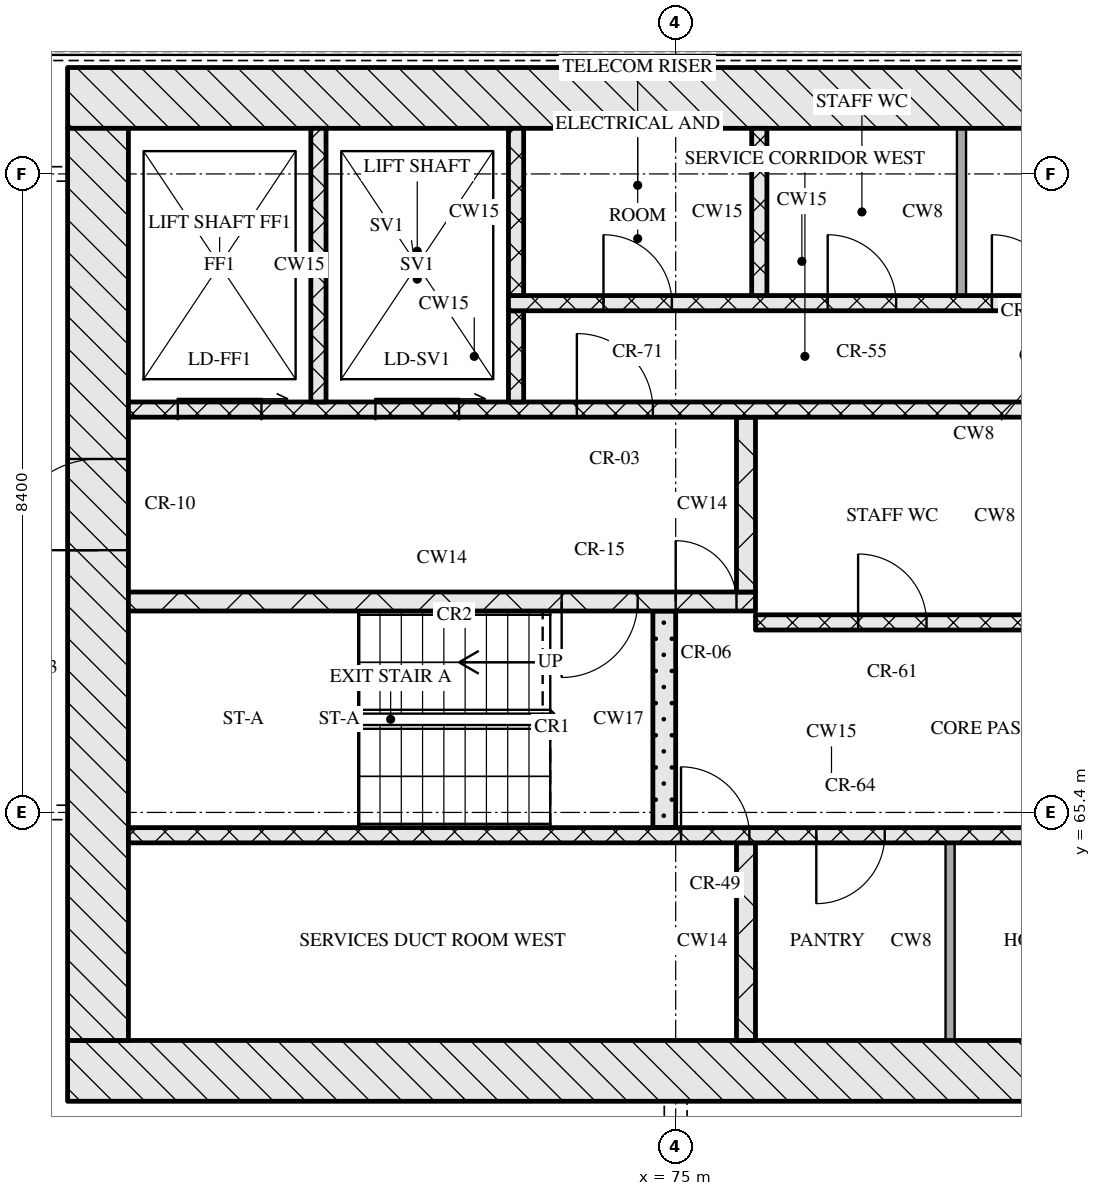
"""IFC4 building model, lengths in metres.
Left out: names, types, materials, properties, quantities, classifications, styles, units other than length and angle.
Written with IfcOpenShell. Run it as: python <this file> out.ifc"""

import sys

from ifc_helpers import new_model, si_unit, direction, frame, frame_2d, origin, place, context, subcontext, project, spatial, rectangle, extrude, element, fill, save


model = new_model("IFC4")
c1 = context("Model", 3, precision=1e-05, world=origin(), true_north=direction((0.0, 1.0)))
c2 = subcontext(c1, "Body", "Model", "MODEL_VIEW")
j1 = project(units=[si_unit("LENGTHUNIT", "METRE"), si_unit("PLANEANGLEUNIT", "RADIAN")], contexts=[c1])
p1 = place(None, origin())
s1 = spatial("IfcSite", under=j1, at=p1, CompositionType="ELEMENT")
p2 = place(p1, origin())
s2 = spatial("IfcBuilding", under=s1, at=p2, CompositionType="ELEMENT")
p3 = place(p2, frame((0.0, 0.0, 169.05)))
s3 = spatial("IfcBuildingStorey", under=s2, at=p3, CompositionType="ELEMENT", Elevation=169.05)
p4 = place(p3, frame((67.0, 62.0, 0.0), z_axis=(0.0, 0.0, 1.0), x_axis=(1.0, 0.0, 0.0)))
e1 = element("IfcWall", 1, at=p4, inside=s3, PredefinedType="SOLIDWALL", context=c2, shape_type="SweptSolid", body=[
    extrude(rectangle(XDim=41.2, YDim=0.8, at=frame_2d((20.6, 0.0))), origin(), (0.0, 0.0, 1.0), 3.32),
])
p5 = place(p4, frame((20.95, 0.0, 0.0)))
e2 = element("IfcOpeningElement", 2, at=p5, cuts=e1, PredefinedType="OPENING", context=c2, shape_type="SweptSolid", body=[
    extrude(rectangle(XDim=1.8, YDim=2.1, at=frame_2d((0.9, 1.05))), frame((0.0, 0.41, 0.0), z_axis=(0.0, -1.0, 0.0), x_axis=(1.0, 0.0, 0.0)), (0.0, 0.0, 1.0), 0.82),
])
p6 = place(p3, frame((67.0, 74.8, 0.0), z_axis=(0.0, 0.0, 1.0), x_axis=(1.0, 0.0, 0.0)))
e3 = element("IfcWall", 3, at=p6, inside=s3, PredefinedType="SOLIDWALL", context=c2, shape_type="SweptSolid", body=[
    extrude(rectangle(XDim=41.2, YDim=0.8, at=frame_2d((20.6, 0.0))), origin(), (0.0, 0.0, 1.0), 3.32),
])
p7 = place(p3, frame((67.4, 62.4, 0.0), z_axis=(0.0, 0.0, 1.0), x_axis=(0.0, 1.0, 0.0)))
e4 = element("IfcWall", 4, at=p7, inside=s3, PredefinedType="SOLIDWALL", context=c2, shape_type="SweptSolid", body=[
    extrude(rectangle(XDim=12.0, YDim=0.8, at=frame_2d((6.0, 0.0))), origin(), (0.0, 0.0, 1.0), 3.32),
])
p8 = place(p7, frame((6.45, 0.0, 0.0)))
e5 = element("IfcOpeningElement", 5, at=p8, cuts=e4, PredefinedType="OPENING", context=c2, shape_type="SweptSolid", body=[
    extrude(rectangle(XDim=1.2, YDim=2.1, at=frame_2d((0.6, 1.05))), frame((0.0, 0.41, 0.0), z_axis=(0.0, -1.0, 0.0), x_axis=(1.0, 0.0, 0.0)), (0.0, 0.0, 1.0), 0.82),
])
p9 = place(p3, frame((75.925, 62.4, 0.0), z_axis=(0.0, 0.0, 1.0), x_axis=(0.0, 1.0, 0.0)))
e6 = element("IfcWall", 6, at=p9, inside=s3, PredefinedType="SOLIDWALL", context=c2, shape_type="SweptSolid", body=[
    extrude(rectangle(XDim=2.6, YDim=0.25, at=frame_2d((1.3, 0.0))), origin(), (0.0, 0.0, 1.0), 3.32),
])
p10 = place(p3, frame((78.61, 62.4, 0.0), z_axis=(0.0, 0.0, 1.0), x_axis=(0.0, 1.0, 0.0)))
e7 = element("IfcWall", 7, at=p10, inside=s3, PredefinedType="PARTITIONING", context=c2, shape_type="SweptSolid", body=[
    extrude(rectangle(XDim=2.6, YDim=0.12, at=frame_2d((1.3, 0.0))), origin(), (0.0, 0.0, 1.0), 3.32),
])
p11 = place(p3, frame((67.8, 65.1, 0.0), z_axis=(0.0, 0.0, 1.0), x_axis=(1.0, 0.0, 0.0)))
e8 = element("IfcWall", 8, at=p11, inside=s3, PredefinedType="SOLIDWALL", context=c2, shape_type="SweptSolid", body=[
    extrude(rectangle(XDim=18.5, YDim=0.2, at=frame_2d((9.25, 0.0))), origin(), (0.0, 0.0, 1.0), 3.32),
])
p12 = place(p11, frame((7.27, 0.0, 0.0)))
e9 = element("IfcOpeningElement", 9, at=p12, cuts=e8, PredefinedType="OPENING", context=c2, shape_type="SweptSolid", body=[
    extrude(rectangle(XDim=0.9, YDim=2.1, at=frame_2d((0.45, 1.05))), frame((0.0, 0.11, 0.0), z_axis=(0.0, -1.0, 0.0), x_axis=(1.0, 0.0, 0.0)), (0.0, 0.0, 1.0), 0.22),
])
p13 = place(p11, frame((9.05, 0.0, 0.0)))
e10 = element("IfcOpeningElement", 10, at=p13, cuts=e8, PredefinedType="OPENING", context=c2, shape_type="SweptSolid", body=[
    extrude(rectangle(XDim=0.9, YDim=2.1, at=frame_2d((0.45, 1.05))), frame((0.0, 0.11, 0.0), z_axis=(0.0, -1.0, 0.0), x_axis=(1.0, 0.0, 0.0)), (0.0, 0.0, 1.0), 0.22),
])
p14 = place(p11, frame((12.76, 0.0, 0.0)))
e11 = element("IfcOpeningElement", 11, at=p14, cuts=e8, PredefinedType="OPENING", context=c2, shape_type="SweptSolid", body=[
    extrude(rectangle(XDim=0.9, YDim=2.1, at=frame_2d((0.45, 1.05))), frame((0.0, 0.11, 0.0), z_axis=(0.0, -1.0, 0.0), x_axis=(1.0, 0.0, 0.0)), (0.0, 0.0, 1.0), 0.22),
])
p15 = place(p11, frame((16.7, 0.0, 0.0)))
e12 = element("IfcOpeningElement", 12, at=p15, cuts=e8, PredefinedType="OPENING", context=c2, shape_type="SweptSolid", body=[
    extrude(rectangle(XDim=0.9, YDim=2.1, at=frame_2d((0.45, 1.05))), frame((0.0, 0.11, 0.0), z_axis=(0.0, -1.0, 0.0), x_axis=(1.0, 0.0, 0.0)), (0.0, 0.0, 1.0), 0.22),
])
p16 = place(p3, frame((74.85, 65.2, 0.0), z_axis=(0.0, 0.0, 1.0), x_axis=(0.0, 1.0, 0.0)))
e13 = element("IfcWall", 13, at=p16, inside=s3, PredefinedType="SOLIDWALL", context=c2, shape_type="SweptSolid", body=[
    extrude(rectangle(XDim=2.85, YDim=0.3, at=frame_2d((1.425, 0.0))), origin(), (0.0, 0.0, 1.0), 3.32),
])
p17 = place(p3, frame((76.05, 67.9, 0.0), z_axis=(0.0, 0.0, 1.0), x_axis=(1.0, 0.0, 0.0)))
e14 = element("IfcWall", 14, at=p17, inside=s3, PredefinedType="SOLIDWALL", context=c2, shape_type="SweptSolid", body=[
    extrude(rectangle(XDim=23.1, YDim=0.2, at=frame_2d((11.55, 0.0))), origin(), (0.0, 0.0, 1.0), 3.32),
])
p18 = place(p17, frame((1.35, 0.0, 0.0)))
e15 = element("IfcOpeningElement", 15, at=p18, cuts=e14, PredefinedType="OPENING", context=c2, shape_type="SweptSolid", body=[
    extrude(rectangle(XDim=0.9, YDim=2.1, at=frame_2d((0.45, 1.05))), frame((0.0, 0.11, 0.0), z_axis=(0.0, -1.0, 0.0), x_axis=(1.0, 0.0, 0.0)), (0.0, 0.0, 1.0), 0.22),
])
p19 = place(p17, frame((5.06, 0.0, 0.0)))
e16 = element("IfcOpeningElement", 16, at=p19, cuts=e14, PredefinedType="OPENING", context=c2, shape_type="SweptSolid", body=[
    extrude(rectangle(XDim=0.9, YDim=2.1, at=frame_2d((0.45, 1.05))), frame((0.0, 0.11, 0.0), z_axis=(0.0, -1.0, 0.0), x_axis=(1.0, 0.0, 0.0)), (0.0, 0.0, 1.0), 0.22),
])
p20 = place(p17, frame((8.45, 0.0, 0.0)))
e17 = element("IfcOpeningElement", 17, at=p20, cuts=e14, PredefinedType="OPENING", context=c2, shape_type="SweptSolid", body=[
    extrude(rectangle(XDim=0.9, YDim=2.1, at=frame_2d((0.45, 1.05))), frame((0.0, 0.11, 0.0), z_axis=(0.0, -1.0, 0.0), x_axis=(1.0, 0.0, 0.0)), (0.0, 0.0, 1.0), 0.22),
])
p21 = place(p17, frame((10.91, 0.0, 0.0)))
e18 = element("IfcOpeningElement", 18, at=p21, cuts=e14, PredefinedType="OPENING", context=c2, shape_type="SweptSolid", body=[
    extrude(rectangle(XDim=0.9, YDim=2.1, at=frame_2d((0.45, 1.05))), frame((0.0, 0.11, 0.0), z_axis=(0.0, -1.0, 0.0), x_axis=(1.0, 0.0, 0.0)), (0.0, 0.0, 1.0), 0.22),
])
p22 = place(p17, frame((13.55, 0.0, 0.0)))
e19 = element("IfcOpeningElement", 19, at=p22, cuts=e14, PredefinedType="OPENING", context=c2, shape_type="SweptSolid", body=[
    extrude(rectangle(XDim=1.0, YDim=2.1, at=frame_2d((0.5, 1.05))), frame((0.0, 0.11, 0.0), z_axis=(0.0, -1.0, 0.0), x_axis=(1.0, 0.0, 0.0)), (0.0, 0.0, 1.0), 0.22),
])
p23 = place(p17, frame((16.2, 0.0, 0.0)))
e20 = element("IfcOpeningElement", 20, at=p23, cuts=e14, PredefinedType="OPENING", context=c2, shape_type="SweptSolid", body=[
    extrude(rectangle(XDim=1.1, YDim=2.1, at=frame_2d((0.55, 1.05))), frame((0.0, 0.11, 0.0), z_axis=(0.0, -1.0, 0.0), x_axis=(1.0, 0.0, 0.0)), (0.0, 0.0, 1.0), 0.22),
])
p24 = place(p17, frame((18.7, 0.0, 0.0)))
e21 = element("IfcOpeningElement", 21, at=p24, cuts=e14, PredefinedType="OPENING", context=c2, shape_type="SweptSolid", body=[
    extrude(rectangle(XDim=1.1, YDim=2.1, at=frame_2d((0.55, 1.05))), frame((0.0, 0.11, 0.0), z_axis=(0.0, -1.0, 0.0), x_axis=(1.0, 0.0, 0.0)), (0.0, 0.0, 1.0), 0.22),
])
p25 = place(p17, frame((21.2, 0.0, 0.0)))
e22 = element("IfcOpeningElement", 22, at=p25, cuts=e14, PredefinedType="OPENING", context=c2, shape_type="SweptSolid", body=[
    extrude(rectangle(XDim=1.1, YDim=2.1, at=frame_2d((0.55, 1.05))), frame((0.0, 0.11, 0.0), z_axis=(0.0, -1.0, 0.0), x_axis=(1.0, 0.0, 0.0)), (0.0, 0.0, 1.0), 0.22),
])
p26 = place(p3, frame((67.8, 68.175, 0.0), z_axis=(0.0, 0.0, 1.0), x_axis=(1.0, 0.0, 0.0)))
e23 = element("IfcWall", 23, at=p26, inside=s3, PredefinedType="SOLIDWALL", context=c2, shape_type="SweptSolid", body=[
    extrude(rectangle(XDim=8.25, YDim=0.25, at=frame_2d((4.125, 0.0))), origin(), (0.0, 0.0, 1.0), 3.32),
])
p27 = place(p26, frame((5.7, 0.0, 0.0)))
e24 = element("IfcOpeningElement", 24, at=p27, cuts=e23, PredefinedType="OPENING", context=c2, shape_type="SweptSolid", body=[
    extrude(rectangle(XDim=1.0, YDim=2.1, at=frame_2d((0.5, 1.05))), frame((0.0, 0.135, 0.0), z_axis=(0.0, -1.0, 0.0), x_axis=(1.0, 0.0, 0.0)), (0.0, 0.0, 1.0), 0.27),
])
p28 = place(p26, frame((7.2, 0.0, 0.0)))
e25 = element("IfcOpeningElement", 25, at=p28, cuts=e23, PredefinedType="OPENING", context=c2, shape_type="SweptSolid", body=[
    extrude(rectangle(XDim=0.8, YDim=2.1, at=frame_2d((0.4, 1.05))), frame((0.0, 0.135, 0.0), z_axis=(0.0, -1.0, 0.0), x_axis=(1.0, 0.0, 0.0)), (0.0, 0.0, 1.0), 0.27),
])
p29 = place(p3, frame((75.925, 68.3, 0.0), z_axis=(0.0, 0.0, 1.0), x_axis=(0.0, 1.0, 0.0)))
e26 = element("IfcWall", 26, at=p29, inside=s3, PredefinedType="SOLIDWALL", context=c2, shape_type="SweptSolid", body=[
    extrude(rectangle(XDim=2.3, YDim=0.25, at=frame_2d((1.15, 0.0))), origin(), (0.0, 0.0, 1.0), 3.32),
])
p30 = place(p3, frame((67.8, 70.7, 0.0), z_axis=(0.0, 0.0, 1.0), x_axis=(1.0, 0.0, 0.0)))
e27 = element("IfcWall", 27, at=p30, inside=s3, PredefinedType="SOLIDWALL", context=c2, shape_type="SweptSolid", body=[
    extrude(rectangle(XDim=39.6, YDim=0.2, at=frame_2d((19.8, 0.0))), origin(), (0.0, 0.0, 1.0), 3.32),
])
p31 = place(p30, frame((0.65, 0.0, 0.0)))
e28 = element("IfcOpeningElement", 28, at=p31, cuts=e27, PredefinedType="OPENING", context=c2, shape_type="SweptSolid", body=[
    extrude(rectangle(XDim=1.1, YDim=2.1, at=frame_2d((0.55, 1.05))), frame((0.0, 0.11, 0.0), z_axis=(0.0, -1.0, 0.0), x_axis=(1.0, 0.0, 0.0)), (0.0, 0.0, 1.0), 0.22),
])
p32 = place(p30, frame((3.25, 0.0, 0.0)))
e29 = element("IfcOpeningElement", 29, at=p32, cuts=e27, PredefinedType="OPENING", context=c2, shape_type="SweptSolid", body=[
    extrude(rectangle(XDim=1.1, YDim=2.1, at=frame_2d((0.55, 1.05))), frame((0.0, 0.11, 0.0), z_axis=(0.0, -1.0, 0.0), x_axis=(1.0, 0.0, 0.0)), (0.0, 0.0, 1.0), 0.22),
])
p33 = place(p30, frame((5.9, 0.0, 0.0)))
e30 = element("IfcOpeningElement", 30, at=p33, cuts=e27, PredefinedType="OPENING", context=c2, shape_type="SweptSolid", body=[
    extrude(rectangle(XDim=1.0, YDim=2.1, at=frame_2d((0.5, 1.05))), frame((0.0, 0.11, 0.0), z_axis=(0.0, -1.0, 0.0), x_axis=(1.0, 0.0, 0.0)), (0.0, 0.0, 1.0), 0.22),
])
p34 = place(p30, frame((21.7, 0.0, 0.0)))
e31 = element("IfcOpeningElement", 31, at=p34, cuts=e27, PredefinedType="OPENING", context=c2, shape_type="SweptSolid", body=[
    extrude(rectangle(XDim=1.0, YDim=2.1, at=frame_2d((0.5, 1.05))), frame((0.0, 0.11, 0.0), z_axis=(0.0, -1.0, 0.0), x_axis=(1.0, 0.0, 0.0)), (0.0, 0.0, 1.0), 0.22),
])
p35 = place(p30, frame((32.7, 0.0, 0.0)))
e32 = element("IfcOpeningElement", 32, at=p35, cuts=e27, PredefinedType="OPENING", context=c2, shape_type="SweptSolid", body=[
    extrude(rectangle(XDim=1.0, YDim=2.1, at=frame_2d((0.5, 1.05))), frame((0.0, 0.11, 0.0), z_axis=(0.0, -1.0, 0.0), x_axis=(1.0, 0.0, 0.0)), (0.0, 0.0, 1.0), 0.22),
])
p36 = place(p30, frame((35.25, 0.0, 0.0)))
e33 = element("IfcOpeningElement", 33, at=p36, cuts=e27, PredefinedType="OPENING", context=c2, shape_type="SweptSolid", body=[
    extrude(rectangle(XDim=1.1, YDim=2.1, at=frame_2d((0.55, 1.05))), frame((0.0, 0.11, 0.0), z_axis=(0.0, -1.0, 0.0), x_axis=(1.0, 0.0, 0.0)), (0.0, 0.0, 1.0), 0.22),
])
p37 = place(p30, frame((37.85, 0.0, 0.0)))
e34 = element("IfcOpeningElement", 34, at=p37, cuts=e27, PredefinedType="OPENING", context=c2, shape_type="SweptSolid", body=[
    extrude(rectangle(XDim=1.1, YDim=2.1, at=frame_2d((0.55, 1.05))), frame((0.0, 0.11, 0.0), z_axis=(0.0, -1.0, 0.0), x_axis=(1.0, 0.0, 0.0)), (0.0, 0.0, 1.0), 0.22),
])
p38 = place(p3, frame((70.3, 70.8, 0.0), z_axis=(0.0, 0.0, 1.0), x_axis=(0.0, 1.0, 0.0)))
e35 = element("IfcWall", 35, at=p38, inside=s3, PredefinedType="SOLIDWALL", context=c2, shape_type="SweptSolid", body=[
    extrude(rectangle(XDim=3.6, YDim=0.2, at=frame_2d((1.8, 0.0))), origin(), (0.0, 0.0, 1.0), 3.32),
])
p39 = place(p3, frame((72.9, 70.8, 0.0), z_axis=(0.0, 0.0, 1.0), x_axis=(0.0, 1.0, 0.0)))
e36 = element("IfcWall", 36, at=p39, inside=s3, PredefinedType="SOLIDWALL", context=c2, shape_type="SweptSolid", body=[
    extrude(rectangle(XDim=1.2, YDim=0.2, at=frame_2d((0.6, 0.0))), origin(), (0.0, 0.0, 1.0), 3.32),
])
p40 = place(p3, frame((72.8, 72.1, 0.0), z_axis=(0.0, 0.0, 1.0), x_axis=(1.0, 0.0, 0.0)))
e37 = element("IfcWall", 37, at=p40, inside=s3, PredefinedType="SOLIDWALL", context=c2, shape_type="SweptSolid", body=[
    extrude(rectangle(XDim=7.72, YDim=0.2, at=frame_2d((3.86, 0.0))), origin(), (0.0, 0.0, 1.0), 3.32),
])
p41 = place(p40, frame((1.25, 0.0, 0.0)))
e38 = element("IfcOpeningElement", 38, at=p41, cuts=e37, PredefinedType="OPENING", context=c2, shape_type="SweptSolid", body=[
    extrude(rectangle(XDim=0.9, YDim=2.1, at=frame_2d((0.45, 1.05))), frame((0.0, 0.11, 0.0), z_axis=(0.0, -1.0, 0.0), x_axis=(1.0, 0.0, 0.0)), (0.0, 0.0, 1.0), 0.22),
])
p42 = place(p40, frame((4.2, 0.0, 0.0)))
e39 = element("IfcOpeningElement", 39, at=p42, cuts=e37, PredefinedType="OPENING", context=c2, shape_type="SweptSolid", body=[
    extrude(rectangle(XDim=0.9, YDim=2.1, at=frame_2d((0.45, 1.05))), frame((0.0, 0.11, 0.0), z_axis=(0.0, -1.0, 0.0), x_axis=(1.0, 0.0, 0.0)), (0.0, 0.0, 1.0), 0.22),
])
p43 = place(p40, frame((6.36, 0.0, 0.0)))
e40 = element("IfcOpeningElement", 40, at=p43, cuts=e37, PredefinedType="OPENING", context=c2, shape_type="SweptSolid", body=[
    extrude(rectangle(XDim=0.9, YDim=2.1, at=frame_2d((0.45, 1.05))), frame((0.0, 0.11, 0.0), z_axis=(0.0, -1.0, 0.0), x_axis=(1.0, 0.0, 0.0)), (0.0, 0.0, 1.0), 0.22),
])
for number, where, z_axis, x_axis in (
    (41, (72.9, 72.2, 0.0), (0.0, 0.0, 1.0), (0.0, 1.0, 0.0)),
    (42, (76.1, 72.2, 0.0), (0.0, 0.0, 1.0), (0.0, 1.0, 0.0)),
):
    element("IfcWall", number, at=place(p3, frame(where, z_axis=z_axis, x_axis=x_axis)), inside=s3, PredefinedType="SOLIDWALL", context=c2, shape_type="SweptSolid", body=[
        extrude(rectangle(XDim=2.2, YDim=0.2, at=frame_2d((1.1, 0.0))), origin(), (0.0, 0.0, 1.0), 3.32),
    ])
p44 = place(p3, frame((78.76, 72.2, 0.0), z_axis=(0.0, 0.0, 1.0), x_axis=(0.0, 1.0, 0.0)))
e43 = element("IfcWall", 43, at=p44, inside=s3, PredefinedType="PARTITIONING", context=c2, shape_type="SweptSolid", body=[
    extrude(rectangle(XDim=2.2, YDim=0.12, at=frame_2d((1.1, 0.0))), origin(), (0.0, 0.0, 1.0), 3.32),
])
p45 = place(p12, origin())
e44 = element("IfcDoor", 44, at=p45, inside=s3, OperationType="SINGLE_SWING_LEFT", PredefinedType="DOOR", context=c2, shape_type="SweptSolid", body=[
    extrude(rectangle(XDim=0.9, YDim=2.1, at=frame_2d((0.45, 1.05))), frame((0.0, 0.025, 0.0), z_axis=(0.0, -1.0, 0.0), x_axis=(1.0, 0.0, 0.0)), (0.0, 0.0, 1.0), 0.05),
])
fill(e9, e44)
p46 = place(p13, origin())
e45 = element("IfcDoor", 45, at=p46, inside=s3, OperationType="SINGLE_SWING_RIGHT", PredefinedType="DOOR", context=c2, shape_type="SweptSolid", body=[
    extrude(rectangle(XDim=0.9, YDim=2.1, at=frame_2d((0.45, 1.05))), frame((0.0, 0.025, 0.0), z_axis=(0.0, -1.0, 0.0), x_axis=(1.0, 0.0, 0.0)), (0.0, 0.0, 1.0), 0.05),
])
fill(e10, e45)
p47 = place(p18, origin())
e46 = element("IfcDoor", 46, at=p47, inside=s3, OperationType="SINGLE_SWING_LEFT", PredefinedType="DOOR", context=c2, shape_type="SweptSolid", body=[
    extrude(rectangle(XDim=0.9, YDim=2.1, at=frame_2d((0.45, 1.05))), frame((0.0, 0.025, 0.0), z_axis=(0.0, -1.0, 0.0), x_axis=(1.0, 0.0, 0.0)), (0.0, 0.0, 1.0), 0.05),
])
fill(e15, e46)
p48 = place(p27, origin())
e47 = element("IfcDoor", 47, at=p48, inside=s3, OperationType="SINGLE_SWING_RIGHT", PredefinedType="DOOR", context=c2, shape_type="SweptSolid", body=[
    extrude(rectangle(XDim=1.0, YDim=2.1, at=frame_2d((0.5, 1.05))), frame((0.0, 0.025, 0.0), z_axis=(0.0, -1.0, 0.0), x_axis=(1.0, 0.0, 0.0)), (0.0, 0.0, 1.0), 0.05),
])
fill(e24, e47)
p49 = place(p28, origin())
e48 = element("IfcDoor", 48, at=p49, inside=s3, OperationType="SINGLE_SWING_LEFT", PredefinedType="DOOR", context=c2, shape_type="SweptSolid", body=[
    extrude(rectangle(XDim=0.8, YDim=2.1, at=frame_2d((0.4, 1.05))), frame((0.0, 0.025, 0.0), z_axis=(0.0, -1.0, 0.0), x_axis=(1.0, 0.0, 0.0)), (0.0, 0.0, 1.0), 0.05),
])
fill(e25, e48)
p50 = place(p8, origin())
e49 = element("IfcDoor", 49, at=p50, inside=s3, OperationType="SINGLE_SWING_LEFT", PredefinedType="DOOR", context=c2, shape_type="SweptSolid", body=[
    extrude(rectangle(XDim=1.2, YDim=2.1, at=frame_2d((0.6, 1.05))), frame((0.0, 0.025, 0.0), z_axis=(0.0, -1.0, 0.0), x_axis=(1.0, 0.0, 0.0)), (0.0, 0.0, 1.0), 0.05),
])
fill(e5, e49)
p51 = place(p31, origin())
e50 = element("IfcDoor", 50, at=p51, inside=s3, OperationType="SLIDING_TO_RIGHT", PredefinedType="DOOR", context=c2, shape_type="SweptSolid", body=[
    extrude(rectangle(XDim=1.1, YDim=2.1, at=frame_2d((0.55, 1.05))), frame((0.0, 0.025, 0.0), z_axis=(0.0, -1.0, 0.0), x_axis=(1.0, 0.0, 0.0)), (0.0, 0.0, 1.0), 0.05),
])
fill(e28, e50)
p52 = place(p32, origin())
e51 = element("IfcDoor", 51, at=p52, inside=s3, OperationType="SLIDING_TO_RIGHT", PredefinedType="DOOR", context=c2, shape_type="SweptSolid", body=[
    extrude(rectangle(XDim=1.1, YDim=2.1, at=frame_2d((0.55, 1.05))), frame((0.0, 0.025, 0.0), z_axis=(0.0, -1.0, 0.0), x_axis=(1.0, 0.0, 0.0)), (0.0, 0.0, 1.0), 0.05),
])
fill(e29, e51)
p53 = place(p33, origin())
e52 = element("IfcDoor", 52, at=p53, inside=s3, OperationType="SINGLE_SWING_LEFT", PredefinedType="DOOR", context=c2, shape_type="SweptSolid", body=[
    extrude(rectangle(XDim=1.0, YDim=2.1, at=frame_2d((0.5, 1.05))), frame((0.0, 0.025, 0.0), z_axis=(0.0, -1.0, 0.0), x_axis=(1.0, 0.0, 0.0)), (0.0, 0.0, 1.0), 0.05),
])
fill(e30, e52)
p54 = place(p41, origin())
e53 = element("IfcDoor", 53, at=p54, inside=s3, OperationType="SINGLE_SWING_LEFT", PredefinedType="DOOR", context=c2, shape_type="SweptSolid", body=[
    extrude(rectangle(XDim=0.9, YDim=2.1, at=frame_2d((0.45, 1.05))), frame((0.0, 0.025, 0.0), z_axis=(0.0, -1.0, 0.0), x_axis=(1.0, 0.0, 0.0)), (0.0, 0.0, 1.0), 0.05),
])
fill(e38, e53)
p55 = place(p42, origin())
e54 = element("IfcDoor", 54, at=p55, inside=s3, OperationType="SINGLE_SWING_LEFT", PredefinedType="DOOR", context=c2, shape_type="SweptSolid", body=[
    extrude(rectangle(XDim=0.9, YDim=2.1, at=frame_2d((0.45, 1.05))), frame((0.0, 0.025, 0.0), z_axis=(0.0, -1.0, 0.0), x_axis=(1.0, 0.0, 0.0)), (0.0, 0.0, 1.0), 0.05),
])
fill(e39, e54)
p56 = place(p43, origin())
e55 = element("IfcDoor", 55, at=p56, inside=s3, OperationType="SINGLE_SWING_LEFT", PredefinedType="DOOR", context=c2, shape_type="SweptSolid", body=[
    extrude(rectangle(XDim=0.9, YDim=2.1, at=frame_2d((0.45, 1.05))), frame((0.0, 0.025, 0.0), z_axis=(0.0, -1.0, 0.0), x_axis=(1.0, 0.0, 0.0)), (0.0, 0.0, 1.0), 0.05),
])
fill(e40, e55)
save(model, sys.argv[1])
